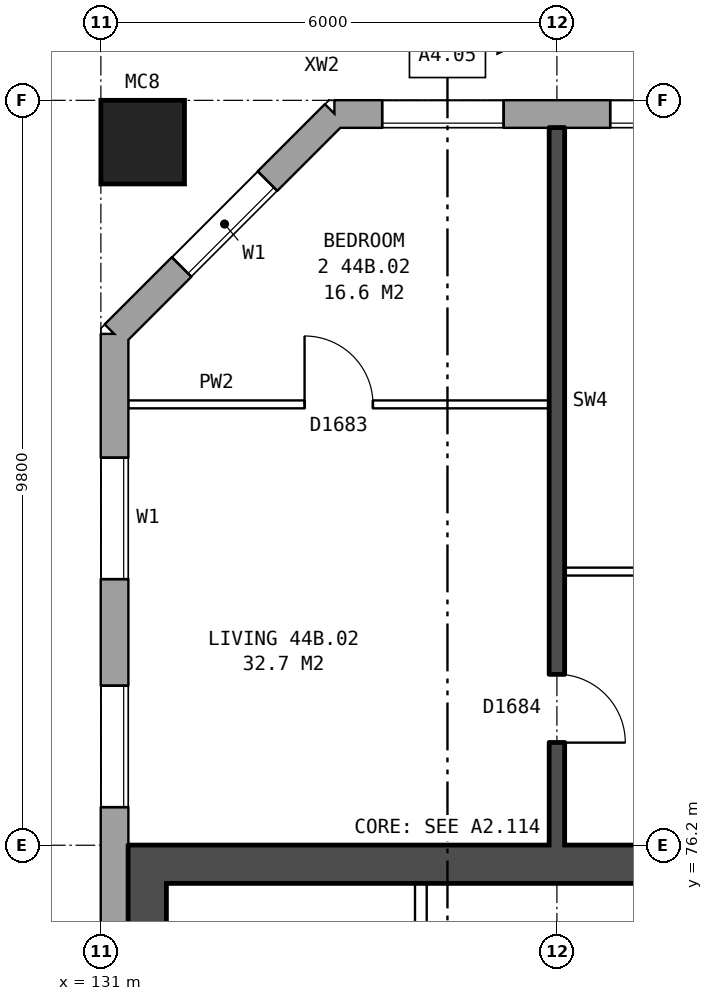
"""IFC4 building model, lengths in metres.
Left out: names, types, materials, properties, quantities, classifications, styles, units other than length and angle.
Written with IfcOpenShell. Run it as: python <this file> out.ifc"""

import sys

from ifc_helpers import new_model, si_unit, direction, frame, frame_2d, origin, origin_2d, place, context, subcontext, project, spatial, rectangle, hollow_rectangle, extrude, element, fill, save


model = new_model("IFC4")
c1 = context("Model", 3, precision=1e-05, world=origin(), true_north=direction((0.0, 1.0)))
c2 = subcontext(c1, "Body", "Model", "MODEL_VIEW")
j1 = project(units=[si_unit("LENGTHUNIT", "METRE"), si_unit("PLANEANGLEUNIT", "RADIAN")], contexts=[c1])
p1 = place(None, origin())
s1 = spatial("IfcSite", under=j1, at=p1, CompositionType="ELEMENT")
p2 = place(p1, origin())
s2 = spatial("IfcBuilding", under=s1, at=p2, CompositionType="ELEMENT")
p3 = place(p2, frame((0.0, 0.0, 157.8)))
s3 = spatial("IfcBuildingStorey", under=s2, at=p3, CompositionType="ELEMENT", Elevation=157.8)
p4 = place(p3, frame((131.55, 85.45, 0.0), z_axis=(0.0, 0.0, 1.0), x_axis=(1.0, 0.0, 0.0)))
e1 = element("IfcColumn", 1, at=p4, inside=s3, PredefinedType="COLUMN", context=c2, shape_type="SweptSolid", body=[
    extrude(hollow_rectangle(XDim=1.1, YDim=1.1, WallThickness=0.06, at=origin_2d()), origin(), (0.0, 0.0, 1.0), 3.1),
])
p5 = place(p3, frame((168.425, 85.82, 0.0), z_axis=(0.0, 0.0, 1.0), x_axis=(-1.0, 0.0, 0.0)))
e2 = element("IfcWall", 2, at=p5, inside=s3, PredefinedType="STANDARD", context=c2, shape_type="SweptSolid", body=[
    extrude(rectangle(XDim=34.351, YDim=0.36, at=frame_2d((17.175, 0.0))), origin(), (0.0, 0.0, 1.0), 2.85),
])
p6 = place(p5, frame((2.125, 0.0, 0.8)))
e3 = element("IfcOpeningElement", 3, at=p6, cuts=e2, PredefinedType="OPENING", context=c2, shape_type="SweptSolid", body=[
    extrude(rectangle(XDim=1.6, YDim=1.8, at=frame_2d((0.8, 0.9))), frame((0.0, 0.19, 0.0), z_axis=(0.0, -1.0, 0.0), x_axis=(1.0, 0.0, 0.0)), (0.0, 0.0, 1.0), 0.38),
])
p7 = place(p5, frame((5.125, 0.0, 0.8)))
e4 = element("IfcOpeningElement", 4, at=p7, cuts=e2, PredefinedType="OPENING", context=c2, shape_type="SweptSolid", body=[
    extrude(rectangle(XDim=1.6, YDim=1.8, at=frame_2d((0.8, 0.9))), frame((0.0, 0.19, 0.0), z_axis=(0.0, -1.0, 0.0), x_axis=(1.0, 0.0, 0.0)), (0.0, 0.0, 1.0), 0.38),
])
p8 = place(p5, frame((7.625, 0.0, 1.7)))
e5 = element("IfcOpeningElement", 5, at=p8, cuts=e2, PredefinedType="OPENING", context=c2, shape_type="SweptSolid", body=[
    extrude(rectangle(XDim=1.2, YDim=0.9, at=frame_2d((0.6, 0.45))), frame((0.0, 0.19, 0.0), z_axis=(0.0, -1.0, 0.0), x_axis=(1.0, 0.0, 0.0)), (0.0, 0.0, 1.0), 0.38),
])
p9 = place(p5, frame((11.125, 0.0, 0.8)))
e6 = element("IfcOpeningElement", 6, at=p9, cuts=e2, PredefinedType="OPENING", context=c2, shape_type="SweptSolid", body=[
    extrude(rectangle(XDim=1.6, YDim=1.8, at=frame_2d((0.8, 0.9))), frame((0.0, 0.19, 0.0), z_axis=(0.0, -1.0, 0.0), x_axis=(1.0, 0.0, 0.0)), (0.0, 0.0, 1.0), 0.38),
])
p10 = place(p5, frame((14.125, 0.0, 0.8)))
e7 = element("IfcOpeningElement", 7, at=p10, cuts=e2, PredefinedType="OPENING", context=c2, shape_type="SweptSolid", body=[
    extrude(rectangle(XDim=1.6, YDim=1.8, at=frame_2d((0.8, 0.9))), frame((0.0, 0.19, 0.0), z_axis=(0.0, -1.0, 0.0), x_axis=(1.0, 0.0, 0.0)), (0.0, 0.0, 1.0), 0.38),
])
p11 = place(p5, frame((17.125, 0.0, 0.8)))
e8 = element("IfcOpeningElement", 8, at=p11, cuts=e2, PredefinedType="OPENING", context=c2, shape_type="SweptSolid", body=[
    extrude(rectangle(XDim=1.6, YDim=1.8, at=frame_2d((0.8, 0.9))), frame((0.0, 0.19, 0.0), z_axis=(0.0, -1.0, 0.0), x_axis=(1.0, 0.0, 0.0)), (0.0, 0.0, 1.0), 0.38),
])
p12 = place(p5, frame((20.125, 0.0, 0.8)))
e9 = element("IfcOpeningElement", 9, at=p12, cuts=e2, PredefinedType="OPENING", context=c2, shape_type="SweptSolid", body=[
    extrude(rectangle(XDim=1.6, YDim=1.8, at=frame_2d((0.8, 0.9))), frame((0.0, 0.19, 0.0), z_axis=(0.0, -1.0, 0.0), x_axis=(1.0, 0.0, 0.0)), (0.0, 0.0, 1.0), 0.38),
])
p13 = place(p5, frame((22.575, 0.0, 0.45)))
e10 = element("IfcOpeningElement", 10, at=p13, cuts=e2, PredefinedType="OPENING", context=c2, shape_type="SweptSolid", body=[
    extrude(rectangle(XDim=1.2, YDim=1.8, at=frame_2d((0.6, 0.9))), frame((0.0, 0.19, 0.0), z_axis=(0.0, -1.0, 0.0), x_axis=(1.0, 0.0, 0.0)), (0.0, 0.0, 1.0), 0.38),
])
p14 = place(p5, frame((25.875, 0.0, 1.4)))
e11 = element("IfcOpeningElement", 11, at=p14, cuts=e2, PredefinedType="OPENING", context=c2, shape_type="SweptSolid", body=[
    extrude(rectangle(XDim=1.0, YDim=1.2, at=frame_2d((0.5, 0.6))), frame((0.0, 0.19, 0.0), z_axis=(0.0, -1.0, 0.0), x_axis=(1.0, 0.0, 0.0)), (0.0, 0.0, 1.0), 0.38),
])
p15 = place(p5, frame((29.125, 0.0, 0.8)))
e12 = element("IfcOpeningElement", 12, at=p15, cuts=e2, PredefinedType="OPENING", context=c2, shape_type="SweptSolid", body=[
    extrude(rectangle(XDim=1.6, YDim=1.8, at=frame_2d((0.8, 0.9))), frame((0.0, 0.19, 0.0), z_axis=(0.0, -1.0, 0.0), x_axis=(1.0, 0.0, 0.0)), (0.0, 0.0, 1.0), 0.38),
])
p16 = place(p5, frame((32.125, 0.0, 0.8)))
e13 = element("IfcOpeningElement", 13, at=p16, cuts=e2, PredefinedType="OPENING", context=c2, shape_type="SweptSolid", body=[
    extrude(rectangle(XDim=1.6, YDim=1.8, at=frame_2d((0.8, 0.9))), frame((0.0, 0.19, 0.0), z_axis=(0.0, -1.0, 0.0), x_axis=(1.0, 0.0, 0.0)), (0.0, 0.0, 1.0), 0.38),
])
p17 = place(p5, frame((9.975, 0.0, 0.8)))
e14 = element("IfcOpeningElement", 14, at=p17, cuts=e2, PredefinedType="OPENING", context=c2, shape_type="SweptSolid", body=[
    extrude(rectangle(XDim=0.8, YDim=0.9, at=frame_2d((0.4, 0.45))), frame((0.0, 0.19, 0.0), z_axis=(0.0, -1.0, 0.0), x_axis=(1.0, 0.0, 0.0)), (0.0, 0.0, 1.0), 0.38),
])
p18 = place(p5, frame((24.075, 0.0, 0.35)))
e15 = element("IfcOpeningElement", 15, at=p18, cuts=e2, PredefinedType="OPENING", context=c2, shape_type="SweptSolid", body=[
    extrude(rectangle(XDim=0.8, YDim=0.9, at=frame_2d((0.4, 0.45))), frame((0.0, 0.19, 0.0), z_axis=(0.0, -1.0, 0.0), x_axis=(1.0, 0.0, 0.0)), (0.0, 0.0, 1.0), 0.38),
])
p19 = place(p5, frame((27.175, 0.0, 0.8)))
e16 = element("IfcOpeningElement", 16, at=p19, cuts=e2, PredefinedType="OPENING", context=c2, shape_type="SweptSolid", body=[
    extrude(rectangle(XDim=1.4, YDim=1.8, at=frame_2d((0.7, 0.9))), frame((0.0, 0.19, 0.0), z_axis=(0.0, -1.0, 0.0), x_axis=(1.0, 0.0, 0.0)), (0.0, 0.0, 1.0), 0.38),
])
p20 = place(p3, frame((134.075, 85.82, 0.0), z_axis=(0.0, 0.0, 1.0), x_axis=(-0.707106781187, -0.707106781187, 0.0)))
e17 = element("IfcWall", 17, at=p20, inside=s3, PredefinedType="STANDARD", context=c2, shape_type="SweptSolid", body=[
    extrude(rectangle(XDim=4.094, YDim=0.36, at=frame_2d((2.047, 0.0))), origin(), (0.0, 0.0, 1.0), 2.85),
])
p21 = place(p20, frame((1.247, 0.0, 0.8)))
e18 = element("IfcOpeningElement", 18, at=p21, cuts=e17, PredefinedType="OPENING", context=c2, shape_type="SweptSolid", body=[
    extrude(rectangle(XDim=1.6, YDim=1.8, at=frame_2d((0.8, 0.9))), frame((0.0, 0.19, 0.0), z_axis=(0.0, -1.0, 0.0), x_axis=(1.0, 0.0, 0.0)), (0.0, 0.0, 1.0), 0.38),
])
p22 = place(p3, frame((131.18, 82.925, 0.0), z_axis=(0.0, 0.0, 1.0), x_axis=(0.0, -1.0, 0.0)))
e19 = element("IfcWall", 19, at=p22, inside=s3, PredefinedType="STANDARD", context=c2, shape_type="SweptSolid", body=[
    extrude(rectangle(XDim=25.851, YDim=0.36, at=frame_2d((12.925, 0.0))), origin(), (0.0, 0.0, 1.0), 2.85),
])
p23 = place(p22, frame((1.625, 0.0, 0.8)))
e20 = element("IfcOpeningElement", 20, at=p23, cuts=e19, PredefinedType="OPENING", context=c2, shape_type="SweptSolid", body=[
    extrude(rectangle(XDim=1.6, YDim=1.8, at=frame_2d((0.8, 0.9))), frame((0.0, 0.19, 0.0), z_axis=(0.0, -1.0, 0.0), x_axis=(1.0, 0.0, 0.0)), (0.0, 0.0, 1.0), 0.38),
])
p24 = place(p22, frame((4.625, 0.0, 0.8)))
e21 = element("IfcOpeningElement", 21, at=p24, cuts=e19, PredefinedType="OPENING", context=c2, shape_type="SweptSolid", body=[
    extrude(rectangle(XDim=1.6, YDim=1.8, at=frame_2d((0.8, 0.9))), frame((0.0, 0.19, 0.0), z_axis=(0.0, -1.0, 0.0), x_axis=(1.0, 0.0, 0.0)), (0.0, 0.0, 1.0), 0.38),
])
p25 = place(p22, frame((19.625, 0.0, 0.8)))
e22 = element("IfcOpeningElement", 22, at=p25, cuts=e19, PredefinedType="OPENING", context=c2, shape_type="SweptSolid", body=[
    extrude(rectangle(XDim=1.6, YDim=1.8, at=frame_2d((0.8, 0.9))), frame((0.0, 0.19, 0.0), z_axis=(0.0, -1.0, 0.0), x_axis=(1.0, 0.0, 0.0)), (0.0, 0.0, 1.0), 0.38),
])
p26 = place(p22, frame((22.625, 0.0, 0.8)))
e23 = element("IfcOpeningElement", 23, at=p26, cuts=e19, PredefinedType="OPENING", context=c2, shape_type="SweptSolid", body=[
    extrude(rectangle(XDim=1.6, YDim=1.8, at=frame_2d((0.8, 0.9))), frame((0.0, 0.19, 0.0), z_axis=(0.0, -1.0, 0.0), x_axis=(1.0, 0.0, 0.0)), (0.0, 0.0, 1.0), 0.38),
])
p27 = place(p3, frame((131.61, 63.8, 0.0), z_axis=(0.0, 0.0, 1.0), x_axis=(0.0, 1.0, 0.0)))
e24 = element("IfcWall", 24, at=p27, inside=s3, PredefinedType="SHEAR", context=c2, shape_type="SweptSolid", body=[
    extrude(rectangle(XDim=12.4, YDim=0.5, at=frame_2d((6.2, 0.0))), origin(), (0.0, 0.0, 1.0), 2.85),
])
p28 = place(p3, frame((139.26, 75.95, 0.0), z_axis=(0.0, 0.0, 1.0), x_axis=(-1.0, 0.0, 0.0)))
e25 = element("IfcWall", 25, at=p28, inside=s3, PredefinedType="SHEAR", context=c2, shape_type="SweptSolid", body=[
    extrude(rectangle(XDim=7.4, YDim=0.5, at=frame_2d((3.7, 0.0))), origin(), (0.0, 0.0, 1.0), 2.85),
])
p29 = place(p3, frame((135.21, 71.375, 0.0), z_axis=(0.0, 0.0, 1.0), x_axis=(0.0, 1.0, 0.0)))
e26 = element("IfcWall", 26, at=p29, inside=s3, PredefinedType="PARTITIONING", context=c2, shape_type="SweptSolid", body=[
    extrude(rectangle(XDim=4.325, YDim=0.15, at=frame_2d((2.163, 0.0))), origin(), (0.0, 0.0, 1.0), 2.85),
])
p30 = place(p29, frame((2.65, 0.0, 0.0)))
e27 = element("IfcOpeningElement", 27, at=p30, cuts=e26, PredefinedType="OPENING", context=c2, shape_type="SweptSolid", body=[
    extrude(rectangle(XDim=1.1, YDim=2.1, at=frame_2d((0.55, 1.05))), frame((0.0, 0.085, 0.0), z_axis=(0.0, -1.0, 0.0), x_axis=(1.0, 0.0, 0.0)), (0.0, 0.0, 1.0), 0.17),
])
p31 = place(p3, frame((137.1, 79.8, 0.0), z_axis=(0.0, 0.0, 1.0), x_axis=(1.0, 0.0, 0.0)))
e28 = element("IfcWall", 28, at=p31, inside=s3, PredefinedType="PARTITIONING", context=c2, shape_type="SweptSolid", body=[
    extrude(rectangle(XDim=5.8, YDim=0.1, at=frame_2d((2.9, 0.0))), origin(), (0.0, 0.0, 1.0), 2.85),
])
p32 = place(p31, frame((1.3, 0.0, 0.0)))
e29 = element("IfcOpeningElement", 29, at=p32, cuts=e28, PredefinedType="OPENING", context=c2, shape_type="SweptSolid", body=[
    extrude(rectangle(XDim=0.9, YDim=2.1, at=frame_2d((0.45, 1.05))), frame((0.0, 0.06, 0.0), z_axis=(0.0, -1.0, 0.0), x_axis=(1.0, 0.0, 0.0)), (0.0, 0.0, 1.0), 0.12),
])
p33 = place(p31, frame((4.2, 0.0, 0.0)))
e30 = element("IfcOpeningElement", 30, at=p33, cuts=e28, PredefinedType="OPENING", context=c2, shape_type="SweptSolid", body=[
    extrude(rectangle(XDim=0.9, YDim=2.1, at=frame_2d((0.45, 1.05))), frame((0.0, 0.06, 0.0), z_axis=(0.0, -1.0, 0.0), x_axis=(1.0, 0.0, 0.0)), (0.0, 0.0, 1.0), 0.12),
])
p34 = place(p3, frame((131.36, 82.0, 0.0), z_axis=(0.0, 0.0, 1.0), x_axis=(1.0, 0.0, 0.0)))
e31 = element("IfcWall", 31, at=p34, inside=s3, PredefinedType="PARTITIONING", context=c2, shape_type="SweptSolid", body=[
    extrude(rectangle(XDim=5.54, YDim=0.1, at=frame_2d((2.77, 0.0))), origin(), (0.0, 0.0, 1.0), 2.85),
])
p35 = place(p34, frame((2.32, 0.0, 0.0)))
e32 = element("IfcOpeningElement", 32, at=p35, cuts=e31, PredefinedType="OPENING", context=c2, shape_type="SweptSolid", body=[
    extrude(rectangle(XDim=0.9, YDim=2.1, at=frame_2d((0.45, 1.05))), frame((0.0, 0.06, 0.0), z_axis=(0.0, -1.0, 0.0), x_axis=(1.0, 0.0, 0.0)), (0.0, 0.0, 1.0), 0.12),
])
p36 = place(p3, frame((137.0, 76.2, 0.0), z_axis=(0.0, 0.0, 1.0), x_axis=(0.0, 1.0, 0.0)))
e33 = element("IfcWall", 33, at=p36, inside=s3, PredefinedType="SOLIDWALL", context=c2, shape_type="SweptSolid", body=[
    extrude(rectangle(XDim=9.44, YDim=0.2, at=frame_2d((4.72, 0.0))), origin(), (0.0, 0.0, 1.0), 2.85),
])
p37 = place(p36, frame((1.35, 0.0, 0.0)))
e34 = element("IfcOpeningElement", 34, at=p37, cuts=e33, PredefinedType="OPENING", context=c2, shape_type="SweptSolid", body=[
    extrude(rectangle(XDim=0.9, YDim=2.1, at=frame_2d((0.45, 1.05))), frame((0.0, 0.11, 0.0), z_axis=(0.0, -1.0, 0.0), x_axis=(1.0, 0.0, 0.0)), (0.0, 0.0, 1.0), 0.22),
])
p38 = place(p15, origin())
e35 = element("IfcWindow", 35, at=p38, inside=s3, PartitioningType="SINGLE_PANEL", PredefinedType="WINDOW", context=c2, shape_type="SweptSolid", body=[
    extrude(rectangle(XDim=1.6, YDim=1.8, at=frame_2d((0.8, 0.9))), frame((0.0, 0.15, 0.0), z_axis=(0.0, -1.0, 0.0), x_axis=(1.0, 0.0, 0.0)), (0.0, 0.0, 1.0), 0.06),
])
fill(e12, e35)
p39 = place(p16, origin())
e36 = element("IfcWindow", 36, at=p39, inside=s3, PartitioningType="SINGLE_PANEL", PredefinedType="WINDOW", context=c2, shape_type="SweptSolid", body=[
    extrude(rectangle(XDim=1.6, YDim=1.8, at=frame_2d((0.8, 0.9))), frame((0.0, 0.15, 0.0), z_axis=(0.0, -1.0, 0.0), x_axis=(1.0, 0.0, 0.0)), (0.0, 0.0, 1.0), 0.06),
])
fill(e13, e36)
p40 = place(p21, origin())
e37 = element("IfcWindow", 37, at=p40, inside=s3, PartitioningType="SINGLE_PANEL", PredefinedType="WINDOW", context=c2, shape_type="SweptSolid", body=[
    extrude(rectangle(XDim=1.6, YDim=1.8, at=frame_2d((0.8, 0.9))), frame((0.0, 0.15, 0.0), z_axis=(0.0, -1.0, 0.0), x_axis=(1.0, 0.0, 0.0)), (0.0, 0.0, 1.0), 0.06),
])
fill(e18, e37)
p41 = place(p23, origin())
e38 = element("IfcWindow", 38, at=p41, inside=s3, PartitioningType="SINGLE_PANEL", PredefinedType="WINDOW", context=c2, shape_type="SweptSolid", body=[
    extrude(rectangle(XDim=1.6, YDim=1.8, at=frame_2d((0.8, 0.9))), frame((0.0, 0.15, 0.0), z_axis=(0.0, -1.0, 0.0), x_axis=(1.0, 0.0, 0.0)), (0.0, 0.0, 1.0), 0.06),
])
fill(e20, e38)
p42 = place(p24, origin())
e39 = element("IfcWindow", 39, at=p42, inside=s3, PartitioningType="SINGLE_PANEL", PredefinedType="WINDOW", context=c2, shape_type="SweptSolid", body=[
    extrude(rectangle(XDim=1.6, YDim=1.8, at=frame_2d((0.8, 0.9))), frame((0.0, 0.15, 0.0), z_axis=(0.0, -1.0, 0.0), x_axis=(1.0, 0.0, 0.0)), (0.0, 0.0, 1.0), 0.06),
])
fill(e21, e39)
p43 = place(p35, origin())
e40 = element("IfcDoor", 40, at=p43, inside=s3, OperationType="SINGLE_SWING_LEFT", PredefinedType="DOOR", context=c2, shape_type="SweptSolid", body=[
    extrude(rectangle(XDim=0.9, YDim=2.1, at=frame_2d((0.45, 1.05))), frame((0.0, 0.025, 0.0), z_axis=(0.0, -1.0, 0.0), x_axis=(1.0, 0.0, 0.0)), (0.0, 0.0, 1.0), 0.05),
])
fill(e32, e40)
p44 = place(p37, frame((0.9, 0.0, 0.0), z_axis=(0.0, 0.0, 1.0), x_axis=(-1.0, 0.0, 0.0)))
e41 = element("IfcDoor", 41, at=p44, inside=s3, OperationType="SINGLE_SWING_RIGHT", PredefinedType="DOOR", context=c2, shape_type="SweptSolid", body=[
    extrude(rectangle(XDim=0.9, YDim=2.1, at=frame_2d((0.45, 1.05))), frame((0.0, 0.025, 0.0), z_axis=(0.0, -1.0, 0.0), x_axis=(1.0, 0.0, 0.0)), (0.0, 0.0, 1.0), 0.05),
])
fill(e34, e41)
save(model, sys.argv[1])
